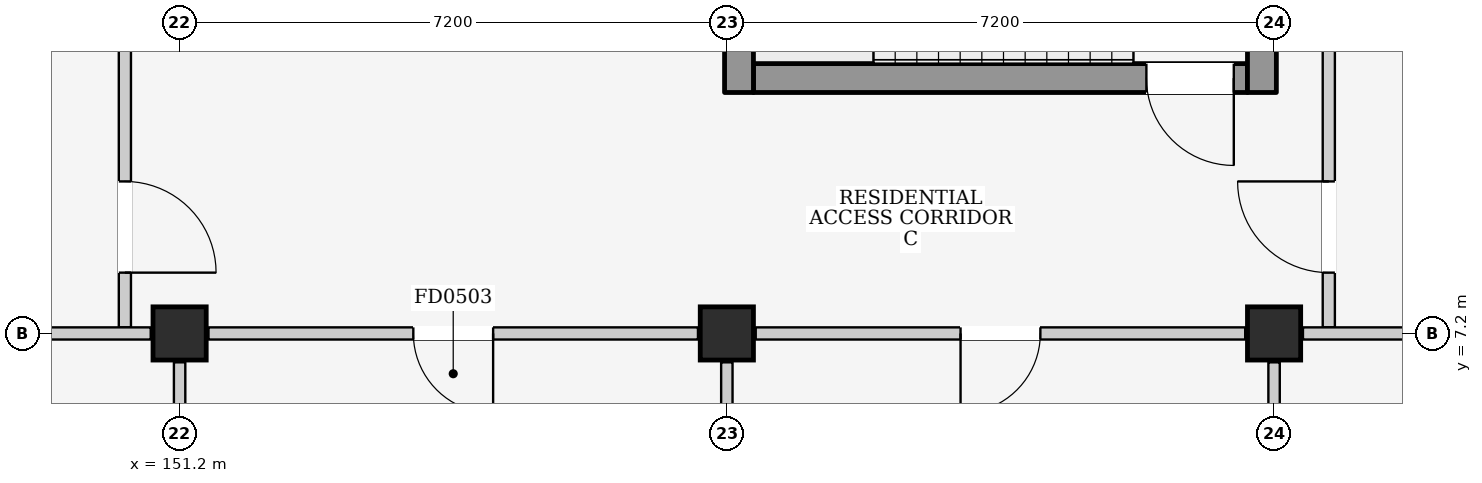
"""IFC4 building model, lengths in metres.
Left out: names, types, materials, properties, quantities, classifications, styles, units other than length and angle.
Written with IfcOpenShell. Run it as: python <this file> out.ifc"""

import sys

from ifc_helpers import new_model, si_unit, direction, frame, frame_2d, origin, origin_2d, place, context, subcontext, project, spatial, rectangle, extrude, element, fill, save


model = new_model("IFC4")
c1 = context("Model", 3, precision=1e-05, world=origin(), true_north=direction((0.0, 1.0)))
c2 = subcontext(c1, "Body", "Model", "MODEL_VIEW")
j1 = project(units=[si_unit("LENGTHUNIT", "METRE"), si_unit("PLANEANGLEUNIT", "RADIAN")], contexts=[c1])
p1 = place(None, origin())
s1 = spatial("IfcSite", under=j1, at=p1, CompositionType="ELEMENT")
p2 = place(p1, origin())
s2 = spatial("IfcBuilding", under=s1, at=p2, CompositionType="ELEMENT")
p3 = place(p2, origin())
s3 = spatial("IfcBuildingStorey", under=s2, at=p3, CompositionType="ELEMENT", Elevation=0.0)
for number, where, z_axis, x_axis in (
    (1, (151.2, 7.2, 0.0), (0.0, 0.0, 1.0), (1.0, 0.0, 0.0)),
    (2, (158.4, 7.2, 0.0), (0.0, 0.0, 1.0), (1.0, 0.0, 0.0)),
    (3, (165.6, 7.2, 0.0), (0.0, 0.0, 1.0), (1.0, 0.0, 0.0)),
):
    element("IfcColumn", number, at=place(p3, frame(where, z_axis=z_axis, x_axis=x_axis)), inside=s3, PredefinedType="COLUMN", context=c2, shape_type="SweptSolid", body=[
        extrude(rectangle(XDim=0.7, YDim=0.7, at=origin_2d()), origin(), (0.0, 0.0, 1.0), 4.5),
    ])
p4 = place(p3, frame((150.48, 7.28, 0.0), z_axis=(0.0, 0.0, 1.0), x_axis=(0.0, 1.0, 0.0)))
e4 = element("IfcWall", 4, at=p4, inside=s3, PredefinedType="PARTITIONING", context=c2, shape_type="SweptSolid", body=[
    extrude(rectangle(XDim=4.32, YDim=0.16, at=frame_2d((2.16, 0.0))), origin(), (0.0, 0.0, 1.0), 4.2),
])
p5 = place(p4, frame((0.72, 0.0, 0.0)))
e5 = element("IfcOpeningElement", 5, at=p5, cuts=e4, PredefinedType="OPENING", context=c2, shape_type="SweptSolid", body=[
    extrude(rectangle(XDim=1.2, YDim=2.2, at=frame_2d((0.6, 1.1))), frame((0.0, 0.095, 0.0), z_axis=(0.0, -1.0, 0.0), x_axis=(1.0, 0.0, 0.0)), (0.0, 0.0, 1.0), 0.19),
])
p6 = place(p3, frame((158.75, 10.56, 0.0), z_axis=(0.0, 0.0, 1.0), x_axis=(1.0, 0.0, 0.0)))
e6 = element("IfcWall", 6, at=p6, inside=s3, PredefinedType="SHEAR", context=c2, shape_type="SweptSolid", body=[
    extrude(rectangle(XDim=6.5, YDim=0.38, at=frame_2d((3.25, 0.0))), origin(), (0.0, 0.0, 1.0), 4.2),
])
p7 = place(p6, frame((5.17, 0.0, 0.0)))
e7 = element("IfcOpeningElement", 7, at=p7, cuts=e6, PredefinedType="OPENING", context=c2, shape_type="SweptSolid", body=[
    extrude(rectangle(XDim=1.15, YDim=2.2, at=frame_2d((0.575, 1.1))), frame((0.0, 0.205, 0.0), z_axis=(0.0, -1.0, 0.0), x_axis=(1.0, 0.0, 0.0)), (0.0, 0.0, 1.0), 0.41),
])
for number, where, z_axis, x_axis in (
    (8, (158.56, 10.37, 0.0), (0.0, 0.0, 1.0), (0.0, 1.0, 0.0)),
    (9, (165.44, 10.37, 0.0), (0.0, 0.0, 1.0), (0.0, 1.0, 0.0)),
):
    element("IfcWall", number, at=place(p3, frame(where, z_axis=z_axis, x_axis=x_axis)), inside=s3, PredefinedType="SHEAR", context=c2, shape_type="SweptSolid", body=[
        extrude(rectangle(XDim=3.76, YDim=0.38, at=frame_2d((1.88, 0.0))), origin(), (0.0, 0.0, 1.0), 4.2),
    ])
p8 = place(p3, frame((166.32, 7.28, 0.0), z_axis=(0.0, 0.0, 1.0), x_axis=(0.0, 1.0, 0.0)))
e10 = element("IfcWall", 10, at=p8, inside=s3, PredefinedType="PARTITIONING", context=c2, shape_type="SweptSolid", body=[
    extrude(rectangle(XDim=4.32, YDim=0.16, at=frame_2d((2.16, 0.0))), origin(), (0.0, 0.0, 1.0), 4.2),
])
p9 = place(p8, frame((0.72, 0.0, 0.0)))
e11 = element("IfcOpeningElement", 11, at=p9, cuts=e10, PredefinedType="OPENING", context=c2, shape_type="SweptSolid", body=[
    extrude(rectangle(XDim=1.2, YDim=2.2, at=frame_2d((0.6, 1.1))), frame((0.0, 0.095, 0.0), z_axis=(0.0, -1.0, 0.0), x_axis=(1.0, 0.0, 0.0)), (0.0, 0.0, 1.0), 0.19),
])
p10 = place(p3, frame((144.38, 7.2, 0.0), z_axis=(0.0, 0.0, 1.0), x_axis=(1.0, 0.0, 0.0)))
e12 = element("IfcWall", 12, at=p10, inside=s3, PredefinedType="PARTITIONING", context=c2, shape_type="SweptSolid", body=[
    extrude(rectangle(XDim=6.44, YDim=0.16, at=frame_2d((3.22, 0.0))), origin(), (0.0, 0.0, 1.0), 3.435),
])
p11 = place(p10, frame((2.66, 0.0, 0.0)))
e13 = element("IfcOpeningElement", 13, at=p11, cuts=e12, PredefinedType="OPENING", context=c2, shape_type="SweptSolid", body=[
    extrude(rectangle(XDim=1.12, YDim=2.2, at=frame_2d((0.56, 1.1))), frame((0.0, 0.095, 0.0), z_axis=(0.0, -1.0, 0.0), x_axis=(1.0, 0.0, 0.0)), (0.0, 0.0, 1.0), 0.19),
])
p12 = place(p3, frame((151.2, 0.38, 0.0), z_axis=(0.0, 0.0, 1.0), x_axis=(0.0, 1.0, 0.0)))
e14 = element("IfcWall", 14, at=p12, inside=s3, PredefinedType="PARTITIONING", context=c2, shape_type="SweptSolid", body=[
    extrude(rectangle(XDim=6.44, YDim=0.15, at=frame_2d((3.22, 0.0))), origin(), (0.0, 0.0, 1.0), 3.435),
])
p13 = place(p3, frame((151.58, 7.2, 0.0), z_axis=(0.0, 0.0, 1.0), x_axis=(1.0, 0.0, 0.0)))
e15 = element("IfcWall", 15, at=p13, inside=s3, PredefinedType="PARTITIONING", context=c2, shape_type="SweptSolid", body=[
    extrude(rectangle(XDim=6.44, YDim=0.16, at=frame_2d((3.22, 0.0))), origin(), (0.0, 0.0, 1.0), 3.435),
])
p14 = place(p13, frame((2.695, 0.0, 0.0)))
e16 = element("IfcOpeningElement", 16, at=p14, cuts=e15, PredefinedType="OPENING", context=c2, shape_type="SweptSolid", body=[
    extrude(rectangle(XDim=1.05, YDim=2.15, at=frame_2d((0.525, 1.075))), frame((0.0, 0.095, 0.0), z_axis=(0.0, -1.0, 0.0), x_axis=(1.0, 0.0, 0.0)), (0.0, 0.0, 1.0), 0.19),
])
p15 = place(p3, frame((158.4, 0.38, 0.0), z_axis=(0.0, 0.0, 1.0), x_axis=(0.0, 1.0, 0.0)))
e17 = element("IfcWall", 17, at=p15, inside=s3, PredefinedType="PARTITIONING", context=c2, shape_type="SweptSolid", body=[
    extrude(rectangle(XDim=6.44, YDim=0.15, at=frame_2d((3.22, 0.0))), origin(), (0.0, 0.0, 1.0), 3.435),
])
p16 = place(p3, frame((158.78, 7.2, 0.0), z_axis=(0.0, 0.0, 1.0), x_axis=(1.0, 0.0, 0.0)))
e18 = element("IfcWall", 18, at=p16, inside=s3, PredefinedType="PARTITIONING", context=c2, shape_type="SweptSolid", body=[
    extrude(rectangle(XDim=6.44, YDim=0.16, at=frame_2d((3.22, 0.0))), origin(), (0.0, 0.0, 1.0), 3.435),
])
p17 = place(p16, frame((2.695, 0.0, 0.0)))
e19 = element("IfcOpeningElement", 19, at=p17, cuts=e18, PredefinedType="OPENING", context=c2, shape_type="SweptSolid", body=[
    extrude(rectangle(XDim=1.05, YDim=2.15, at=frame_2d((0.525, 1.075))), frame((0.0, 0.095, 0.0), z_axis=(0.0, -1.0, 0.0), x_axis=(1.0, 0.0, 0.0)), (0.0, 0.0, 1.0), 0.19),
])
p18 = place(p3, frame((165.6, 0.38, 0.0), z_axis=(0.0, 0.0, 1.0), x_axis=(0.0, 1.0, 0.0)))
e20 = element("IfcWall", 20, at=p18, inside=s3, PredefinedType="PARTITIONING", context=c2, shape_type="SweptSolid", body=[
    extrude(rectangle(XDim=6.44, YDim=0.15, at=frame_2d((3.22, 0.0))), origin(), (0.0, 0.0, 1.0), 3.435),
])
p19 = place(p3, frame((165.98, 7.2, 0.0), z_axis=(0.0, 0.0, 1.0), x_axis=(1.0, 0.0, 0.0)))
e21 = element("IfcWall", 21, at=p19, inside=s3, PredefinedType="PARTITIONING", context=c2, shape_type="SweptSolid", body=[
    extrude(rectangle(XDim=6.44, YDim=0.16, at=frame_2d((3.22, 0.0))), origin(), (0.0, 0.0, 1.0), 3.435),
])
p20 = place(p19, frame((2.66, 0.0, 0.0)))
e22 = element("IfcOpeningElement", 22, at=p20, cuts=e21, PredefinedType="OPENING", context=c2, shape_type="SweptSolid", body=[
    extrude(rectangle(XDim=1.12, YDim=2.2, at=frame_2d((0.56, 1.1))), frame((0.0, 0.095, 0.0), z_axis=(0.0, -1.0, 0.0), x_axis=(1.0, 0.0, 0.0)), (0.0, 0.0, 1.0), 0.19),
])
p21 = place(p5, frame((1.2, 0.0, 0.0), z_axis=(0.0, 0.0, 1.0), x_axis=(-1.0, 0.0, 0.0)))
e23 = element("IfcDoor", 23, at=p21, inside=s3, OperationType="SINGLE_SWING_RIGHT", PredefinedType="DOOR", context=c2, shape_type="SweptSolid", body=[
    extrude(rectangle(XDim=1.2, YDim=2.2, at=frame_2d((0.6, 1.1))), frame((0.0, 0.025, 0.0), z_axis=(0.0, -1.0, 0.0), x_axis=(1.0, 0.0, 0.0)), (0.0, 0.0, 1.0), 0.05),
])
fill(e5, e23)
p22 = place(p7, frame((1.15, 0.0, 0.0), z_axis=(0.0, 0.0, 1.0), x_axis=(-1.0, 0.0, 0.0)))
e24 = element("IfcDoor", 24, at=p22, inside=s3, OperationType="SINGLE_SWING_LEFT", PredefinedType="DOOR", context=c2, shape_type="SweptSolid", body=[
    extrude(rectangle(XDim=1.15, YDim=2.2, at=frame_2d((0.575, 1.1))), frame((0.0, 0.025, 0.0), z_axis=(0.0, -1.0, 0.0), x_axis=(1.0, 0.0, 0.0)), (0.0, 0.0, 1.0), 0.05),
])
fill(e7, e24)
p23 = place(p9, origin())
e25 = element("IfcDoor", 25, at=p23, inside=s3, OperationType="SINGLE_SWING_RIGHT", PredefinedType="DOOR", context=c2, shape_type="SweptSolid", body=[
    extrude(rectangle(XDim=1.2, YDim=2.2, at=frame_2d((0.6, 1.1))), frame((0.0, 0.025, 0.0), z_axis=(0.0, -1.0, 0.0), x_axis=(1.0, 0.0, 0.0)), (0.0, 0.0, 1.0), 0.05),
])
fill(e11, e25)
p24 = place(p14, frame((1.05, 0.0, 0.0), z_axis=(0.0, 0.0, 1.0), x_axis=(-1.0, 0.0, 0.0)))
e26 = element("IfcDoor", 26, at=p24, inside=s3, OperationType="SINGLE_SWING_LEFT", PredefinedType="DOOR", context=c2, shape_type="SweptSolid", body=[
    extrude(rectangle(XDim=1.05, YDim=2.15, at=frame_2d((0.525, 1.075))), frame((0.0, 0.025, 0.0), z_axis=(0.0, -1.0, 0.0), x_axis=(1.0, 0.0, 0.0)), (0.0, 0.0, 1.0), 0.05),
])
fill(e16, e26)
p25 = place(p17, frame((1.05, 0.0, 0.0), z_axis=(0.0, 0.0, 1.0), x_axis=(-1.0, 0.0, 0.0)))
e27 = element("IfcDoor", 27, at=p25, inside=s3, OperationType="SINGLE_SWING_RIGHT", PredefinedType="DOOR", context=c2, shape_type="SweptSolid", body=[
    extrude(rectangle(XDim=1.05, YDim=2.15, at=frame_2d((0.525, 1.075))), frame((0.0, 0.025, 0.0), z_axis=(0.0, -1.0, 0.0), x_axis=(1.0, 0.0, 0.0)), (0.0, 0.0, 1.0), 0.05),
])
fill(e19, e27)
save(model, sys.argv[1])
